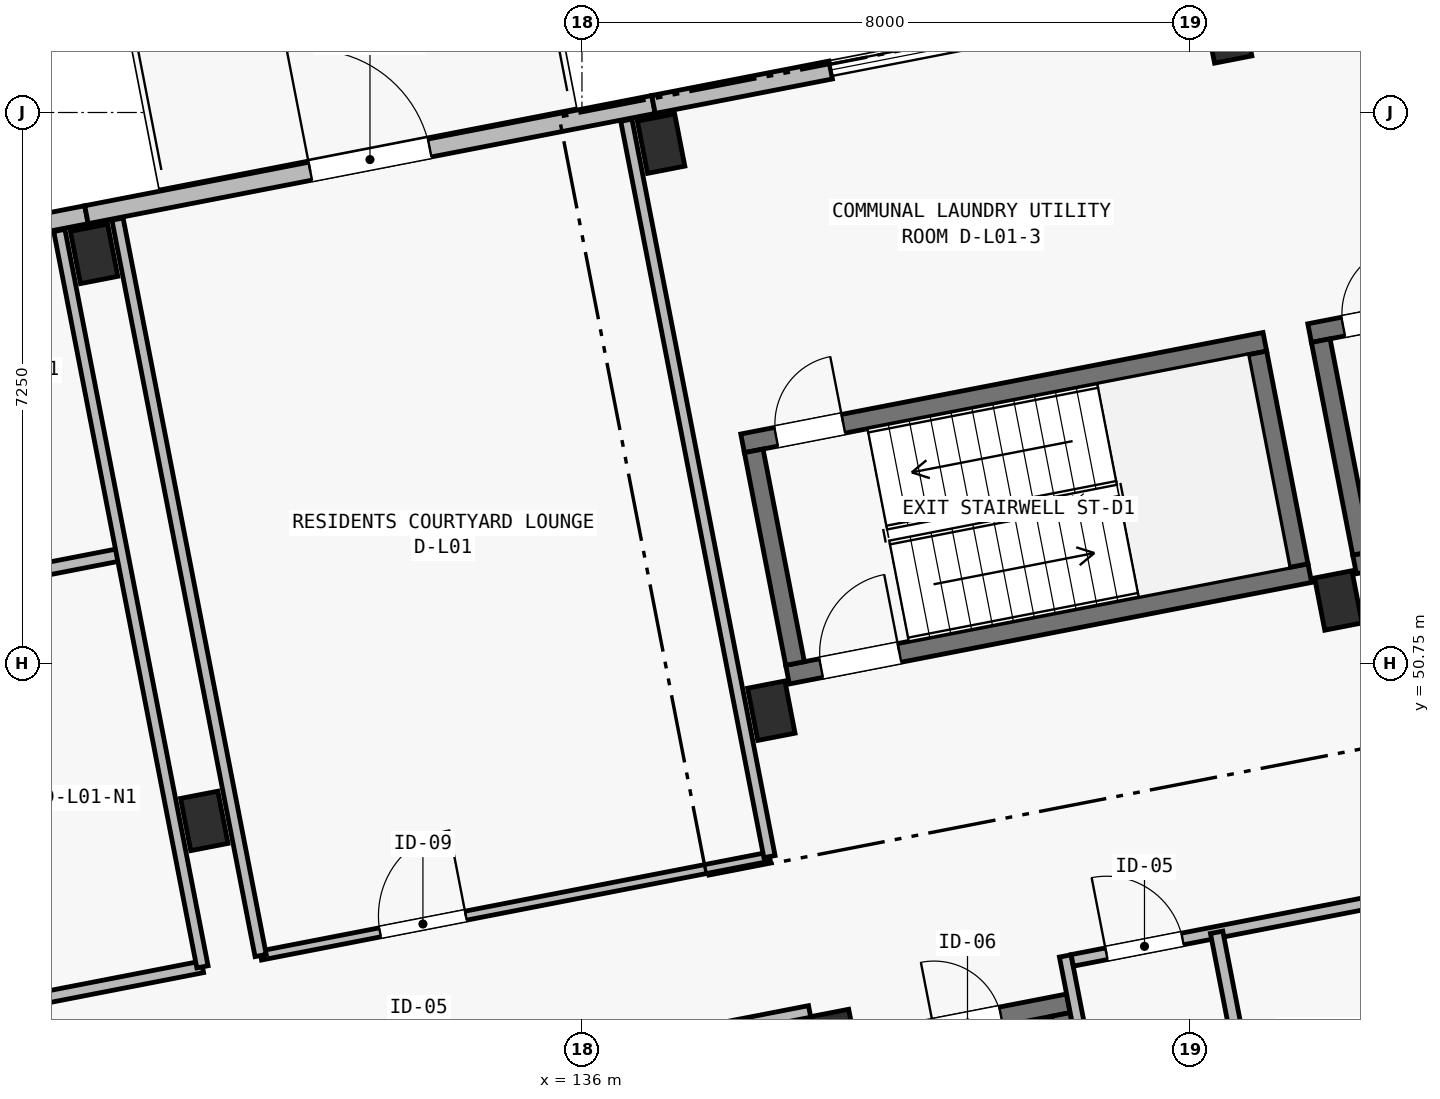
"""IFC4 building model, lengths in metres.
Left out: names, types, materials, properties, quantities, classifications, styles, units other than length and angle.
Written with IfcOpenShell. Run it as: python <this file> out.ifc"""

import sys

from ifc_helpers import new_model, si_unit, direction, frame, frame_2d, origin, origin_2d, place, context, subcontext, project, spatial, rectangle, extrude, element, fill, save


model = new_model("IFC4")
c1 = context("Model", 3, precision=1e-05, world=origin(), true_north=direction((0.0, 1.0)))
c2 = subcontext(c1, "Body", "Model", "MODEL_VIEW")
j1 = project(units=[si_unit("LENGTHUNIT", "METRE"), si_unit("PLANEANGLEUNIT", "RADIAN")], contexts=[c1])
p1 = place(None, origin())
s1 = spatial("IfcSite", under=j1, at=p1, CompositionType="ELEMENT")
p2 = place(p1, origin())
s2 = spatial("IfcBuilding", under=s1, at=p2, CompositionType="ELEMENT")
p3 = place(p2, frame((0.0, 0.0, 4.5)))
s3 = spatial("IfcBuildingStorey", under=s2, at=p3, CompositionType="ELEMENT", Elevation=4.5)
for number, where, z_axis, x_axis in (
    (1, (131.031, 48.68, 0.0), (0.0, 0.0, 1.0), (0.982, 0.191, 0.0)),
    (2, (129.581, 56.14, 0.0), (0.0, 0.0, 1.0), (0.982, 0.191, 0.0)),
    (3, (139.331, 45.811, 0.0), (0.0, 0.0, 1.0), (0.982, 0.191, 0.0)),
    (4, (138.491, 50.13, 0.0), (0.0, 0.0, 1.0), (0.982, 0.191, 0.0)),
    (5, (137.041, 57.59, 0.0), (0.0, 0.0, 1.0), (0.982, 0.191, 0.0)),
    (6, (145.952, 51.58, 0.0), (0.0, 0.0, 1.0), (0.982, 0.191, 0.0)),
    (7, (144.502, 59.041, 0.0), (0.0, 0.0, 1.0), (0.982, 0.191, 0.0)),
):
    element("IfcColumn", number, at=place(p3, frame(where, z_axis=z_axis, x_axis=x_axis)), inside=s3, PredefinedType="COLUMN", context=c2, shape_type="SweptSolid", body=[
        extrude(rectangle(XDim=0.5, YDim=0.7, at=origin_2d()), origin(), (0.0, 0.0, 1.0), 3.9),
    ])
p4 = place(p3, frame((138.113, 53.647, 0.0), z_axis=(0.0, 0.0, 1.0), x_axis=(0.981626097708, 0.19081458094, 0.0)))
e8 = element("IfcWall", 8, at=p4, inside=s3, PredefinedType="SHEAR", context=c2, shape_type="SweptSolid", body=[
    extrude(rectangle(XDim=7.0, YDim=0.25, at=frame_2d((3.5, 0.0))), origin(), (0.0, 0.0, 1.0), 3.9),
])
p5 = place(p4, frame((0.45, 0.0, 0.0)))
e9 = element("IfcOpeningElement", 9, at=p5, cuts=e8, PredefinedType="OPENING", context=c2, shape_type="SweptSolid", body=[
    extrude(rectangle(XDim=0.9, YDim=2.1, at=frame_2d((0.45, 1.05))), frame((0.0, 0.14, 0.0), z_axis=(0.0, -1.0, 0.0), x_axis=(1.0, 0.0, 0.0)), (0.0, 0.0, 1.0), 0.28),
])
p6 = place(p3, frame((138.705, 50.604, 0.0), z_axis=(0.0, 0.0, 1.0), x_axis=(0.981626097708, 0.19081458094, 0.0)))
e10 = element("IfcWall", 10, at=p6, inside=s3, PredefinedType="SHEAR", context=c2, shape_type="SweptSolid", body=[
    extrude(rectangle(XDim=7.0, YDim=0.25, at=frame_2d((3.5, 0.0))), origin(), (0.0, 0.0, 1.0), 3.9),
])
p7 = place(p6, frame((0.45, 0.0, 0.0)))
e11 = element("IfcOpeningElement", 11, at=p7, cuts=e10, PredefinedType="OPENING", context=c2, shape_type="SweptSolid", body=[
    extrude(rectangle(XDim=1.05, YDim=2.15, at=frame_2d((0.525, 1.075))), frame((0.0, 0.14, 0.0), z_axis=(0.0, -1.0, 0.0), x_axis=(1.0, 0.0, 0.0)), (0.0, 0.0, 1.0), 0.28),
])
p8 = place(p3, frame((138.804, 50.751, 0.0), z_axis=(0.0, 0.0, 1.0), x_axis=(-0.190858194834, 0.981617618762, 0.0)))
e12 = element("IfcWall", 12, at=p8, inside=s3, PredefinedType="SHEAR", context=c2, shape_type="SweptSolid", body=[
    extrude(rectangle(XDim=2.85, YDim=0.25, at=frame_2d((1.425, 0.0))), origin(), (0.0, 0.0, 1.0), 3.9),
])
p9 = place(p3, frame((145.43, 52.039, 0.0), z_axis=(0.0, 0.0, 1.0), x_axis=(-0.190842147128, 0.981620738819, 0.0)))
e13 = element("IfcWall", 13, at=p9, inside=s3, PredefinedType="SHEAR", context=c2, shape_type="SweptSolid", body=[
    extrude(rectangle(XDim=2.85, YDim=0.25, at=frame_2d((1.425, 0.0))), origin(), (0.0, 0.0, 1.0), 3.9),
])
p10 = place(p3, frame((145.574, 55.098, 0.0), z_axis=(0.0, 0.0, 1.0), x_axis=(0.981626097708, 0.19081458094, 0.0)))
e14 = element("IfcWall", 14, at=p10, inside=s3, PredefinedType="SHEAR", context=c2, shape_type="SweptSolid", body=[
    extrude(rectangle(XDim=7.0, YDim=0.25, at=frame_2d((3.5, 0.0))), origin(), (0.0, 0.0, 1.0), 3.9),
])
p11 = place(p10, frame((0.45, 0.0, 0.0)))
e15 = element("IfcOpeningElement", 15, at=p11, cuts=e14, PredefinedType="OPENING", context=c2, shape_type="SweptSolid", body=[
    extrude(rectangle(XDim=0.9, YDim=2.1, at=frame_2d((0.45, 1.05))), frame((0.0, 0.14, 0.0), z_axis=(0.0, -1.0, 0.0), x_axis=(1.0, 0.0, 0.0)), (0.0, 0.0, 1.0), 0.28),
])
p12 = place(p3, frame((146.165, 52.054, 0.0), z_axis=(0.0, 0.0, 1.0), x_axis=(0.981627367538, 0.190808048312, 0.0)))
e16 = element("IfcWall", 16, at=p12, inside=s3, PredefinedType="SHEAR", context=c2, shape_type="SweptSolid", body=[
    extrude(rectangle(XDim=7.0, YDim=0.25, at=frame_2d((3.5, 0.0))), origin(), (0.0, 0.0, 1.0), 3.9),
])
p13 = place(p12, frame((0.45, 0.0, 0.0)))
e17 = element("IfcOpeningElement", 17, at=p13, cuts=e16, PredefinedType="OPENING", context=c2, shape_type="SweptSolid", body=[
    extrude(rectangle(XDim=1.05, YDim=2.15, at=frame_2d((0.525, 1.075))), frame((0.0, 0.14, 0.0), z_axis=(0.0, -1.0, 0.0), x_axis=(1.0, 0.0, 0.0)), (0.0, 0.0, 1.0), 0.28),
])
p14 = place(p3, frame((146.264, 52.201, 0.0), z_axis=(0.0, 0.0, 1.0), x_axis=(-0.190775649797, 0.981633664584, 0.0)))
e18 = element("IfcWall", 18, at=p14, inside=s3, PredefinedType="SHEAR", context=c2, shape_type="SweptSolid", body=[
    extrude(rectangle(XDim=2.85, YDim=0.25, at=frame_2d((1.425, 0.0))), origin(), (0.0, 0.0, 1.0), 3.9),
])
p15 = place(p3, frame((139.748, 45.764, 0.0), z_axis=(0.0, 0.0, 1.0), x_axis=(0.981630445883, 0.190792210834, 0.0)))
e19 = element("IfcWall", 19, at=p15, inside=s3, PredefinedType="SHEAR", context=c2, shape_type="SweptSolid", body=[
    extrude(rectangle(XDim=2.7, YDim=0.25, at=frame_2d((1.35, 0.0))), origin(), (0.0, 0.0, 1.0), 3.9),
])
p16 = place(p15, frame((0.9, 0.0, 0.0)))
e20 = element("IfcOpeningElement", 20, at=p16, cuts=e19, PredefinedType="OPENING", context=c2, shape_type="SweptSolid", body=[
    extrude(rectangle(XDim=0.9, YDim=2.05, at=frame_2d((0.45, 1.025))), frame((0.0, 0.14, 0.0), z_axis=(0.0, -1.0, 0.0), x_axis=(1.0, 0.0, 0.0)), (0.0, 0.0, 1.0), 0.28),
])
p17 = place(p3, frame((142.623, 44.464, 0.0), z_axis=(0.0, 0.0, 1.0), x_axis=(-0.190727425199, 0.981643035567, 0.0)))
e21 = element("IfcWall", 21, at=p17, inside=s3, PredefinedType="SHEAR", context=c2, shape_type="SweptSolid", body=[
    extrude(rectangle(XDim=1.7, YDim=0.25, at=frame_2d((0.85, 0.0))), origin(), (0.0, 0.0, 1.0), 3.9),
])
p18 = place(p3, frame((122.02, 55.205, 0.0), z_axis=(0.0, 0.0, 1.0), x_axis=(0.981626422232, 0.190812911449, 0.0)))
e22 = element("IfcWall", 22, at=p18, inside=s3, PredefinedType="SOLIDWALL", context=c2, shape_type="SweptSolid", body=[
    extrude(rectangle(XDim=7.6, YDim=0.24, at=frame_2d((3.8, 0.0))), origin(), (0.0, 0.0, 1.0), 3.65),
])
p19 = place(p18, frame((0.922, 0.0, 0.44)))
e23 = element("IfcOpeningElement", 23, at=p19, cuts=e22, PredefinedType="OPENING", context=c2, shape_type="SweptSolid", body=[
    extrude(rectangle(XDim=0.68, YDim=2.24, at=frame_2d((0.34, 1.12))), frame((0.0, 0.135, 0.0), z_axis=(0.0, -1.0, 0.0), x_axis=(1.0, 0.0, 0.0)), (0.0, 0.0, 1.0), 0.27),
])
p20 = place(p18, frame((5.476, 0.0, 0.5)))
e24 = element("IfcOpeningElement", 24, at=p20, cuts=e22, PredefinedType="OPENING", context=c2, shape_type="SweptSolid", body=[
    extrude(rectangle(XDim=0.76, YDim=2.34, at=frame_2d((0.38, 1.17))), frame((0.0, 0.135, 0.0), z_axis=(0.0, -1.0, 0.0), x_axis=(1.0, 0.0, 0.0)), (0.0, 0.0, 1.0), 0.27),
])
p21 = place(p3, frame((129.481, 56.656, 0.0), z_axis=(0.0, 0.0, 1.0), x_axis=(0.981626422232, 0.190812911449, 0.0)))
e25 = element("IfcWall", 25, at=p21, inside=s3, PredefinedType="SOLIDWALL", context=c2, shape_type="SweptSolid", body=[
    extrude(rectangle(XDim=7.6, YDim=0.24, at=frame_2d((3.8, 0.0))), origin(), (0.0, 0.0, 1.0), 3.65),
])
p22 = place(p21, frame((3.0, 0.0, 0.0)))
e26 = element("IfcOpeningElement", 26, at=p22, cuts=e25, PredefinedType="OPENING", context=c2, shape_type="SweptSolid", body=[
    extrude(rectangle(XDim=1.6, YDim=2.15, at=frame_2d((0.8, 1.075))), frame((0.0, 0.135, 0.0), z_axis=(0.0, -1.0, 0.0), x_axis=(1.0, 0.0, 0.0)), (0.0, 0.0, 1.0), 0.27),
])
p23 = place(p3, frame((136.941, 58.106, 0.0), z_axis=(0.0, 0.0, 1.0), x_axis=(0.981629832251, 0.190795367961, 0.0)))
e27 = element("IfcWall", 27, at=p23, inside=s3, PredefinedType="SOLIDWALL", context=c2, shape_type="SweptSolid", body=[
    extrude(rectangle(XDim=2.375, YDim=0.24, at=frame_2d((1.188, 0.0))), origin(), (0.0, 0.0, 1.0), 3.65),
])
p24 = place(p3, frame((132.046, 44.823, 0.0), z_axis=(0.0, 0.0, 1.0), x_axis=(0.9816234647, 0.190828125677, 0.0)))
e28 = element("IfcWall", 28, at=p24, inside=s3, PredefinedType="PARTITIONING", context=c2, shape_type="SweptSolid", body=[
    extrude(rectangle(XDim=7.08, YDim=0.155, at=frame_2d((3.54, 0.0))), origin(), (0.0, 0.0, 1.0), 3.62),
])
p25 = place(p24, frame((1.33, 0.0, 0.0)))
e29 = element("IfcOpeningElement", 29, at=p25, cuts=e28, PredefinedType="OPENING", context=c2, shape_type="SweptSolid", body=[
    extrude(rectangle(XDim=1.02, YDim=2.2, at=frame_2d((0.51, 1.1))), frame((0.0, 0.093, 0.0), z_axis=(0.0, -1.0, 0.0), x_axis=(1.0, 0.0, 0.0)), (0.0, 0.0, 1.0), 0.185),
])
p26 = place(p3, frame((142.548, 45.927, 0.0), z_axis=(0.0, 0.0, 1.0), x_axis=(-0.190639805817, 0.981660055436, 0.0)))
e30 = element("IfcWall", 30, at=p26, inside=s3, PredefinedType="PARTITIONING", context=c2, shape_type="SweptSolid", body=[
    extrude(rectangle(XDim=0.995, YDim=0.155, at=frame_2d((0.498, 0.0))), origin(), (0.0, 0.0, 1.0), 3.62),
])
p27 = place(p3, frame((142.451, 46.845, 0.0), z_axis=(0.0, 0.0, 1.0), x_axis=(0.981636249117, 0.190762350636, 0.0)))
e31 = element("IfcWall", 31, at=p27, inside=s3, PredefinedType="PARTITIONING", context=c2, shape_type="SweptSolid", body=[
    extrude(rectangle(XDim=4.08, YDim=0.155, at=frame_2d((2.04, 0.0))), origin(), (0.0, 0.0, 1.0), 3.62),
])
p28 = place(p27, frame((0.458, 0.0, 0.0)))
e32 = element("IfcOpeningElement", 32, at=p28, cuts=e31, PredefinedType="OPENING", context=c2, shape_type="SweptSolid", body=[
    extrude(rectangle(XDim=1.02, YDim=2.2, at=frame_2d((0.51, 1.1))), frame((0.0, 0.093, 0.0), z_axis=(0.0, -1.0, 0.0), x_axis=(1.0, 0.0, 0.0)), (0.0, 0.0, 1.0), 0.185),
])
p29 = place(p3, frame((145.089, 43.416, 0.0), z_axis=(0.0, 0.0, 1.0), x_axis=(-0.190835887914, 0.981621955686, 0.0)))
e33 = element("IfcWall", 33, at=p29, inside=s3, PredefinedType="PLUMBINGWALL", context=c2, shape_type="SweptSolid", body=[
    extrude(rectangle(XDim=3.87, YDim=0.165, at=frame_2d((1.935, 0.0))), origin(), (0.0, 0.0, 1.0), 3.62),
])
p30 = place(p3, frame((124.312, 45.459, 0.0), z_axis=(0.0, 0.0, 1.0), x_axis=(0.981627870431, 0.190805461121, 0.0)))
e34 = element("IfcWall", 34, at=p30, inside=s3, PredefinedType="PARTITIONING", context=c2, shape_type="SweptSolid", body=[
    extrude(rectangle(XDim=6.82, YDim=0.155, at=frame_2d((3.41, 0.0))), origin(), (0.0, 0.0, 1.0), 3.62),
])
p31 = place(p30, frame((1.205, 0.0, 0.0)))
e35 = element("IfcOpeningElement", 35, at=p31, cuts=e34, PredefinedType="OPENING", context=c2, shape_type="SweptSolid", body=[
    extrude(rectangle(XDim=0.98, YDim=2.15, at=frame_2d((0.49, 1.075))), frame((0.0, 0.093, 0.0), z_axis=(0.0, -1.0, 0.0), x_axis=(1.0, 0.0, 0.0)), (0.0, 0.0, 1.0), 0.185),
])
p32 = place(p3, frame((126.604, 51.538, 0.0), z_axis=(0.0, 0.0, 1.0), x_axis=(0.98162656706, 0.190812166391, 0.0)))
e36 = element("IfcWall", 36, at=p32, inside=s3, PredefinedType="PLUMBINGWALL", context=c2, shape_type="SweptSolid", body=[
    extrude(rectangle(XDim=3.41, YDim=0.165, at=frame_2d((1.705, 0.0))), origin(), (0.0, 0.0, 1.0), 3.62),
])
p33 = place(p32, frame((1.295, 0.0, 0.0)))
e37 = element("IfcOpeningElement", 37, at=p33, cuts=e36, PredefinedType="OPENING", context=c2, shape_type="SweptSolid", body=[
    extrude(rectangle(XDim=0.82, YDim=2.08, at=frame_2d((0.41, 1.04))), frame((0.0, 0.097, 0.0), z_axis=(0.0, -1.0, 0.0), x_axis=(1.0, 0.0, 0.0)), (0.0, 0.0, 1.0), 0.195),
])
p34 = place(p3, frame((131.007, 46.76, 0.0), z_axis=(0.0, 0.0, 1.0), x_axis=(-0.190809410863, 0.981627102685, 0.0)))
e38 = element("IfcWall", 38, at=p34, inside=s3, PredefinedType="PARTITIONING", context=c2, shape_type="SweptSolid", body=[
    extrude(rectangle(XDim=9.87, YDim=0.15, at=frame_2d((4.935, 0.0))), origin(), (0.0, 0.0, 1.0), 3.62),
])
p35 = place(p3, frame((131.772, 46.909, 0.0), z_axis=(0.0, 0.0, 1.0), x_axis=(0.981622468528, 0.190833249935, 0.0)))
e39 = element("IfcWall", 39, at=p35, inside=s3, PredefinedType="PARTITIONING", context=c2, shape_type="SweptSolid", body=[
    extrude(rectangle(XDim=6.82, YDim=0.12, at=frame_2d((3.41, 0.0))), origin(), (0.0, 0.0, 1.0), 3.62),
])
p36 = place(p35, frame((1.6, 0.0, 0.0)))
e40 = element("IfcOpeningElement", 40, at=p36, cuts=e39, PredefinedType="OPENING", context=c2, shape_type="SweptSolid", body=[
    extrude(rectangle(XDim=1.15, YDim=2.15, at=frame_2d((0.575, 1.075))), frame((0.0, 0.075, 0.0), z_axis=(0.0, -1.0, 0.0), x_axis=(1.0, 0.0, 0.0)), (0.0, 0.0, 1.0), 0.15),
])
p37 = place(p3, frame((131.772, 46.909, 0.0), z_axis=(0.0, 0.0, 1.0), x_axis=(-0.1907855758, 0.981631735462, 0.0)))
e41 = element("IfcWall", 41, at=p37, inside=s3, PredefinedType="PARTITIONING", context=c2, shape_type="SweptSolid", body=[
    extrude(rectangle(XDim=9.87, YDim=0.15, at=frame_2d((4.935, 0.0))), origin(), (0.0, 0.0, 1.0), 3.62),
])
p38 = place(p3, frame((138.467, 48.21, 0.0), z_axis=(0.0, 0.0, 1.0), x_axis=(-0.190814044018, 0.981626202078, 0.0)))
e42 = element("IfcWall", 42, at=p38, inside=s3, PredefinedType="PARTITIONING", context=c2, shape_type="SweptSolid", body=[
    extrude(rectangle(XDim=9.87, YDim=0.15, at=frame_2d((4.935, 0.0))), origin(), (0.0, 0.0, 1.0), 3.62),
])
p39 = place(p22, origin())
e43 = element("IfcDoor", 43, at=p39, inside=s3, OperationType="DOUBLE_DOOR_SINGLE_SWING", PredefinedType="DOOR", context=c2, shape_type="SweptSolid", body=[
    extrude(rectangle(XDim=1.6, YDim=2.15, at=frame_2d((0.8, 1.075))), frame((0.0, 0.025, 0.0), z_axis=(0.0, -1.0, 0.0), x_axis=(1.0, 0.0, 0.0)), (0.0, 0.0, 1.0), 0.05),
])
fill(e26, e43)
p40 = place(p28, origin())
e44 = element("IfcDoor", 44, at=p40, inside=s3, OperationType="SINGLE_SWING_LEFT", PredefinedType="DOOR", context=c2, shape_type="SweptSolid", body=[
    extrude(rectangle(XDim=1.02, YDim=2.2, at=frame_2d((0.51, 1.1))), frame((0.0, 0.025, 0.0), z_axis=(0.0, -1.0, 0.0), x_axis=(1.0, 0.0, 0.0)), (0.0, 0.0, 1.0), 0.05),
])
fill(e32, e44)
p41 = place(p36, origin())
e45 = element("IfcDoor", 45, at=p41, inside=s3, OperationType="SINGLE_SWING_RIGHT", PredefinedType="DOOR", context=c2, shape_type="SweptSolid", body=[
    extrude(rectangle(XDim=1.15, YDim=2.15, at=frame_2d((0.575, 1.075))), frame((0.0, 0.025, 0.0), z_axis=(0.0, -1.0, 0.0), x_axis=(1.0, 0.0, 0.0)), (0.0, 0.0, 1.0), 0.05),
])
fill(e40, e45)
p42 = place(p7, origin())
e46 = element("IfcDoor", 46, at=p42, inside=s3, OperationType="SINGLE_SWING_RIGHT", PredefinedType="DOOR", context=c2, shape_type="SweptSolid", body=[
    extrude(rectangle(XDim=1.05, YDim=2.15, at=frame_2d((0.525, 1.075))), frame((0.0, 0.025, 0.0), z_axis=(0.0, -1.0, 0.0), x_axis=(1.0, 0.0, 0.0)), (0.0, 0.0, 1.0), 0.05),
])
fill(e11, e46)
p43 = place(p5, origin())
e47 = element("IfcDoor", 47, at=p43, inside=s3, OperationType="SINGLE_SWING_RIGHT", PredefinedType="DOOR", context=c2, shape_type="SweptSolid", body=[
    extrude(rectangle(XDim=0.9, YDim=2.1, at=frame_2d((0.45, 1.05))), frame((0.0, 0.025, 0.0), z_axis=(0.0, -1.0, 0.0), x_axis=(1.0, 0.0, 0.0)), (0.0, 0.0, 1.0), 0.05),
])
fill(e9, e47)
p44 = place(p11, origin())
e48 = element("IfcDoor", 48, at=p44, inside=s3, OperationType="SINGLE_SWING_RIGHT", PredefinedType="DOOR", context=c2, shape_type="SweptSolid", body=[
    extrude(rectangle(XDim=0.9, YDim=2.1, at=frame_2d((0.45, 1.05))), frame((0.0, 0.025, 0.0), z_axis=(0.0, -1.0, 0.0), x_axis=(1.0, 0.0, 0.0)), (0.0, 0.0, 1.0), 0.05),
])
fill(e15, e48)
p45 = place(p16, origin())
e49 = element("IfcDoor", 49, at=p45, inside=s3, OperationType="SINGLE_SWING_LEFT", PredefinedType="DOOR", context=c2, shape_type="SweptSolid", body=[
    extrude(rectangle(XDim=0.9, YDim=2.05, at=frame_2d((0.45, 1.025))), frame((0.0, 0.025, 0.0), z_axis=(0.0, -1.0, 0.0), x_axis=(1.0, 0.0, 0.0)), (0.0, 0.0, 1.0), 0.05),
])
fill(e20, e49)
save(model, sys.argv[1])
